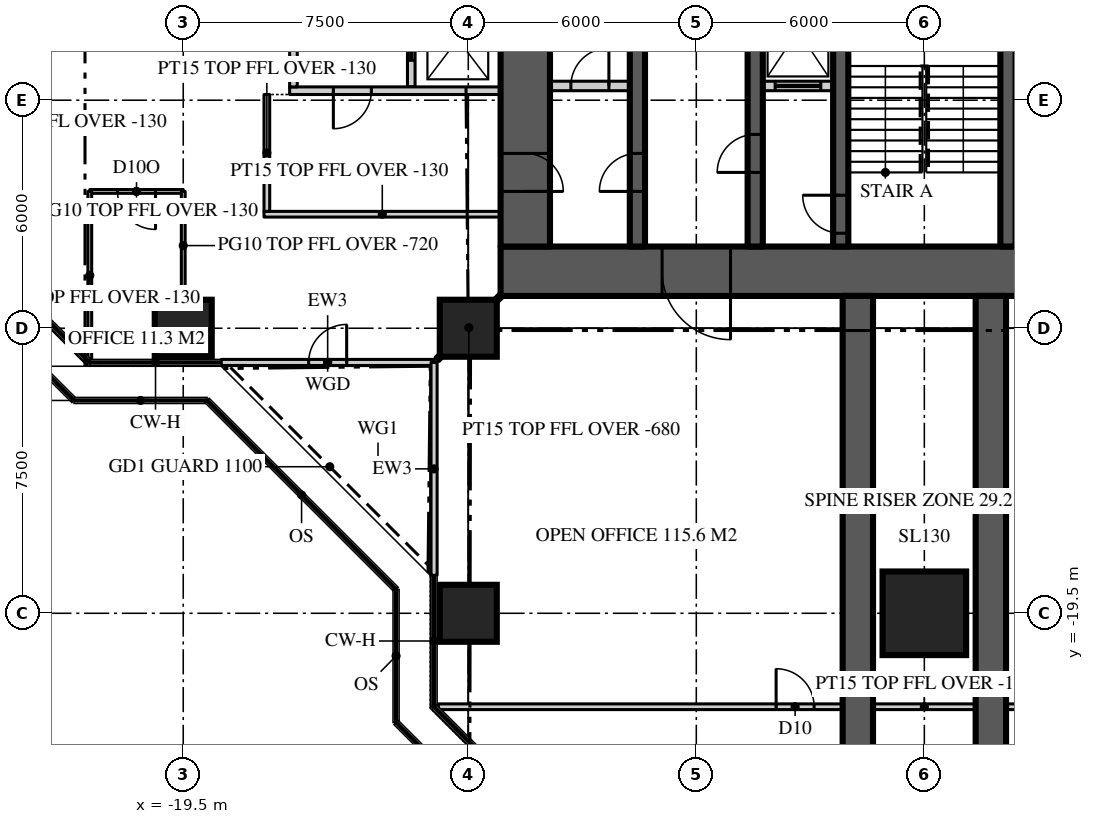
"""IFC4 building model, lengths in metres.
Left out: names, types, materials, properties, quantities, classifications, styles, units other than length and angle.
Written with IfcOpenShell. Run it as: python <this file> out.ifc"""

import sys

from ifc_helpers import new_model, si_unit, direction, frame, frame_2d, origin, origin_2d, place, context, subcontext, project, spatial, rectangle, extrude, element, fill, save


model = new_model("IFC4")
c1 = context("Model", 3, precision=1e-05, world=origin(), true_north=direction((0.0, 1.0)))
c2 = subcontext(c1, "Body", "Model", "MODEL_VIEW")
j1 = project(units=[si_unit("LENGTHUNIT", "METRE"), si_unit("PLANEANGLEUNIT", "RADIAN")], contexts=[c1])
p1 = place(None, origin())
s1 = spatial("IfcSite", under=j1, at=p1, CompositionType="ELEMENT")
p2 = place(p1, origin())
s2 = spatial("IfcBuilding", under=s1, at=p2, CompositionType="ELEMENT")
p3 = place(p2, frame((0.0, 0.0, 204.9)))
s3 = spatial("IfcBuildingStorey", under=s2, at=p3, CompositionType="ELEMENT", Elevation=204.9)
p4 = place(p3, frame((11.15, -10.5, 0.0), z_axis=(0.0, 0.0, 1.0), x_axis=(-1.0, 0.0, 0.0)))
e1 = element("IfcWall", 1, at=p4, inside=s3, PredefinedType="SHEAR", context=c2, shape_type="SweptSolid", body=[
    extrude(rectangle(XDim=22.3, YDim=1.3, at=frame_2d((11.15, 0.0))), origin(), (0.0, 0.0, 1.0), 3.9),
])
p5 = place(p4, frame((16.25, 0.0, 0.0)))
e2 = element("IfcOpeningElement", 2, at=p5, cuts=e1, PredefinedType="OPENING", context=c2, shape_type="SweptSolid", body=[
    extrude(rectangle(XDim=1.8, YDim=2.2, at=frame_2d((0.9, 1.1))), frame((0.0, 0.66, 0.0), z_axis=(0.0, -1.0, 0.0), x_axis=(1.0, 0.0, 0.0)), (0.0, 0.0, 1.0), 1.32),
])
p6 = place(p4, frame((4.25, 0.0, 0.0)))
e3 = element("IfcOpeningElement", 3, at=p6, cuts=e1, PredefinedType="OPENING", context=c2, shape_type="SweptSolid", body=[
    extrude(rectangle(XDim=1.8, YDim=2.2, at=frame_2d((0.9, 1.1))), frame((0.0, 0.66, 0.0), z_axis=(0.0, -1.0, 0.0), x_axis=(1.0, 0.0, 0.0)), (0.0, 0.0, 1.0), 1.32),
])
p7 = place(p3, frame((-10.5, 9.85, 0.0), z_axis=(0.0, 0.0, 1.0), x_axis=(0.0, -1.0, 0.0)))
e4 = element("IfcWall", 4, at=p7, inside=s3, PredefinedType="SHEAR", context=c2, shape_type="SweptSolid", body=[
    extrude(rectangle(XDim=19.7, YDim=1.3, at=frame_2d((9.85, 0.0))), origin(), (0.0, 0.0, 1.0), 3.9),
])
p8 = place(p7, frame((17.25, 0.0, 0.0)))
e5 = element("IfcOpeningElement", 5, at=p8, cuts=e4, PredefinedType="OPENING", context=c2, shape_type="SweptSolid", body=[
    extrude(rectangle(XDim=1.0, YDim=2.2, at=frame_2d((0.5, 1.1))), frame((0.0, 0.66, 0.0), z_axis=(0.0, -1.0, 0.0), x_axis=(1.0, 0.0, 0.0)), (0.0, 0.0, 1.0), 1.32),
])
for number, where, z_axis, x_axis in (
    (6, (-1.75, -11.15, 0.0), (0.0, 0.0, 1.0), (0.0, -1.0, 0.0)),
    (7, (1.75, -11.15, 0.0), (0.0, 0.0, 1.0), (0.0, -1.0, 0.0)),
):
    element("IfcWall", number, at=place(p3, frame(where, z_axis=z_axis, x_axis=x_axis)), inside=s3, PredefinedType="SHEAR", context=c2, shape_type="SweptSolid", body=[
        extrude(rectangle(XDim=15.25, YDim=0.8, at=frame_2d((7.625, 0.0))), origin(), (0.0, 0.0, 1.0), 3.9),
    ])
p9 = place(p3, frame((-12.0, -19.5, 0.0), z_axis=(0.0, 0.0, 1.0), x_axis=(1.0, 0.0, 0.0)))
e8 = element("IfcColumn", 8, at=p9, inside=s3, PredefinedType="COLUMN", context=c2, shape_type="SweptSolid", body=[
    extrude(rectangle(XDim=1.5, YDim=1.5, at=origin_2d()), origin(), (0.0, 0.0, 1.0), 3.9),
])
p10 = place(p3, frame((0.0, -19.5, 0.0), z_axis=(0.0, 0.0, 1.0), x_axis=(1.0, 0.0, 0.0)))
e9 = element("IfcColumn", 9, at=p10, inside=s3, PredefinedType="COLUMN", context=c2, shape_type="SweptSolid", body=[
    extrude(rectangle(XDim=2.2, YDim=2.2, at=origin_2d()), origin(), (0.0, 0.0, 1.0), 3.9),
])
for number, where, z_axis, x_axis in (
    (10, (-19.5, -12.0, 0.0), (0.0, 0.0, 1.0), (1.0, 0.0, 0.0)),
    (11, (-12.0, -12.0, 0.0), (0.0, 0.0, 1.0), (1.0, 0.0, 0.0)),
):
    element("IfcColumn", number, at=place(p3, frame(where, z_axis=z_axis, x_axis=x_axis)), inside=s3, PredefinedType="COLUMN", context=c2, shape_type="SweptSolid", body=[
        extrude(rectangle(XDim=1.5, YDim=1.5, at=origin_2d()), origin(), (0.0, 0.0, 1.0), 3.9),
    ])
p11 = place(p3, frame((-18.5, -12.9, 0.0), z_axis=(0.0, 0.0, 1.0), x_axis=(1.0, 0.0, 0.0)))
e12 = element("IfcWall", 12, at=p11, inside=s3, PredefinedType="SOLIDWALL", context=c2, shape_type="SweptSolid", body=[
    extrude(rectangle(XDim=5.6, YDim=0.16, at=frame_2d((2.8, 0.0))), origin(), (0.0, 0.0, 1.0), 3.77),
])
p12 = place(p11, frame((2.3, 0.0, 0.0)))
e13 = element("IfcOpeningElement", 13, at=p12, cuts=e12, PredefinedType="OPENING", context=c2, shape_type="SweptSolid", body=[
    extrude(rectangle(XDim=1.0, YDim=2.2, at=frame_2d((0.5, 1.1))), frame((0.0, 0.09, 0.0), z_axis=(0.0, -1.0, 0.0), x_axis=(1.0, 0.0, 0.0)), (0.0, 0.0, 1.0), 0.18),
])
p13 = place(p3, frame((-12.9, -12.9, 0.0), z_axis=(0.0, 0.0, 1.0), x_axis=(0.0, -1.0, 0.0)))
e14 = element("IfcWall", 14, at=p13, inside=s3, PredefinedType="SOLIDWALL", context=c2, shape_type="SweptSolid", body=[
    extrude(rectangle(XDim=5.6, YDim=0.16, at=frame_2d((2.8, 0.0))), origin(), (0.0, 0.0, 1.0), 3.77),
])
p14 = place(p3, frame((-7.55, -9.85, 0.0), z_axis=(0.0, 0.0, 1.0), x_axis=(0.0, 1.0, 0.0)))
e15 = element("IfcWall", 15, at=p14, inside=s3, PredefinedType="SHEAR", context=c2, shape_type="SweptSolid", body=[
    extrude(rectangle(XDim=19.7, YDim=0.4, at=frame_2d((9.85, 0.0))), origin(), (0.0, 0.0, 1.0), 3.9),
])
p15 = place(p14, frame((1.45, 0.0, 0.0)))
e16 = element("IfcOpeningElement", 16, at=p15, cuts=e15, PredefinedType="OPENING", context=c2, shape_type="SweptSolid", body=[
    extrude(rectangle(XDim=1.0, YDim=2.2, at=frame_2d((0.5, 1.1))), frame((0.0, 0.21, 0.0), z_axis=(0.0, -1.0, 0.0), x_axis=(1.0, 0.0, 0.0)), (0.0, 0.0, 1.0), 0.42),
])
p16 = place(p14, frame((17.3, 0.0, 0.0)))
e17 = element("IfcOpeningElement", 17, at=p16, cuts=e15, PredefinedType="OPENING", context=c2, shape_type="SweptSolid", body=[
    extrude(rectangle(XDim=0.9, YDim=2.1, at=frame_2d((0.45, 1.05))), frame((0.0, 0.21, 0.0), z_axis=(0.0, -1.0, 0.0), x_axis=(1.0, 0.0, 0.0)), (0.0, 0.0, 1.0), 0.42),
])
p17 = place(p3, frame((-4.45, -9.85, 0.0), z_axis=(0.0, 0.0, 1.0), x_axis=(0.0, 1.0, 0.0)))
e18 = element("IfcWall", 18, at=p17, inside=s3, PredefinedType="SHEAR", context=c2, shape_type="SweptSolid", body=[
    extrude(rectangle(XDim=19.7, YDim=0.4, at=frame_2d((9.85, 0.0))), origin(), (0.0, 0.0, 1.0), 3.9),
])
p18 = place(p17, frame((1.95, 0.0, 0.0)))
e19 = element("IfcOpeningElement", 19, at=p18, cuts=e18, PredefinedType="OPENING", context=c2, shape_type="SweptSolid", body=[
    extrude(rectangle(XDim=1.0, YDim=2.2, at=frame_2d((0.5, 1.1))), frame((0.0, 0.21, 0.0), z_axis=(0.0, -1.0, 0.0), x_axis=(1.0, 0.0, 0.0)), (0.0, 0.0, 1.0), 0.42),
])
p19 = place(p17, frame((17.25, 0.0, 0.0)))
e20 = element("IfcOpeningElement", 20, at=p19, cuts=e18, PredefinedType="OPENING", context=c2, shape_type="SweptSolid", body=[
    extrude(rectangle(XDim=1.0, YDim=2.1, at=frame_2d((0.5, 1.05))), frame((0.0, 0.21, 0.0), z_axis=(0.0, -1.0, 0.0), x_axis=(1.0, 0.0, 0.0)), (0.0, 0.0, 1.0), 0.42),
])
p20 = place(p3, frame((-2.2, -9.85, 0.0), z_axis=(0.0, 0.0, 1.0), x_axis=(0.0, 1.0, 0.0)))
e21 = element("IfcWall", 21, at=p20, inside=s3, PredefinedType="SHEAR", context=c2, shape_type="SweptSolid", body=[
    extrude(rectangle(XDim=19.7, YDim=0.4, at=frame_2d((9.85, 0.0))), origin(), (0.0, 0.0, 1.0), 3.9),
])
p21 = place(p20, frame((0.35, 0.0, 0.0)))
e22 = element("IfcOpeningElement", 22, at=p21, cuts=e21, PredefinedType="OPENING", context=c2, shape_type="SweptSolid", body=[
    extrude(rectangle(XDim=1.0, YDim=2.2, at=frame_2d((0.5, 1.1))), frame((0.0, 0.21, 0.0), z_axis=(0.0, -1.0, 0.0), x_axis=(1.0, 0.0, 0.0)), (0.0, 0.0, 1.0), 0.42),
])
p22 = place(p3, frame((2.2, 9.85, 0.0), z_axis=(0.0, 0.0, 1.0), x_axis=(0.0, -1.0, 0.0)))
e23 = element("IfcWall", 23, at=p22, inside=s3, PredefinedType="SHEAR", context=c2, shape_type="SweptSolid", body=[
    extrude(rectangle(XDim=19.7, YDim=0.4, at=frame_2d((9.85, 0.0))), origin(), (0.0, 0.0, 1.0), 3.9),
])
p23 = place(p22, frame((0.35, 0.0, 0.0)))
e24 = element("IfcOpeningElement", 24, at=p23, cuts=e23, PredefinedType="OPENING", context=c2, shape_type="SweptSolid", body=[
    extrude(rectangle(XDim=1.0, YDim=2.2, at=frame_2d((0.5, 1.1))), frame((0.0, 0.21, 0.0), z_axis=(0.0, -1.0, 0.0), x_axis=(1.0, 0.0, 0.0)), (0.0, 0.0, 1.0), 0.42),
])
p24 = place(p3, frame((-9.85, -5.625, 0.0), z_axis=(0.0, 0.0, 1.0), x_axis=(1.0, 0.0, 0.0)))
e25 = element("IfcWall", 25, at=p24, inside=s3, PredefinedType="SOLIDWALL", context=c2, shape_type="SweptSolid", body=[
    extrude(rectangle(XDim=2.1, YDim=0.25, at=frame_2d((1.05, 0.0))), origin(), (0.0, 0.0, 1.0), 3.7),
])
p25 = place(p24, frame((0.55, 0.0, 0.0)))
e26 = element("IfcOpeningElement", 26, at=p25, cuts=e25, PredefinedType="OPENING", context=c2, shape_type="SweptSolid", body=[
    extrude(rectangle(XDim=1.0, YDim=2.2, at=frame_2d((0.5, 1.1))), frame((0.0, 0.135, 0.0), z_axis=(0.0, -1.0, 0.0), x_axis=(1.0, 0.0, 0.0)), (0.0, 0.0, 1.0), 0.27),
])
p26 = place(p3, frame((-4.25, -5.625, 0.0), z_axis=(0.0, 0.0, 1.0), x_axis=(1.0, 0.0, 0.0)))
e27 = element("IfcWall", 27, at=p26, inside=s3, PredefinedType="SOLIDWALL", context=c2, shape_type="SweptSolid", body=[
    extrude(rectangle(XDim=1.85, YDim=0.25, at=frame_2d((0.925, 0.0))), origin(), (0.0, 0.0, 1.0), 3.7),
])
p27 = place(p26, frame((0.325, 0.0, 0.0)))
e28 = element("IfcOpeningElement", 28, at=p27, cuts=e27, PredefinedType="OPENING", context=c2, shape_type="SweptSolid", body=[
    extrude(rectangle(XDim=1.2, YDim=2.2, at=frame_2d((0.6, 1.1))), frame((0.0, 0.135, 0.0), z_axis=(0.0, -1.0, 0.0), x_axis=(1.0, 0.0, 0.0)), (0.0, 0.0, 1.0), 0.27),
])
p28 = place(p3, frame((-19.5, -8.4, 0.0), z_axis=(0.0, 0.0, 1.0), x_axis=(-1.0, 0.0, 0.0)))
e29 = element("IfcWall", 29, at=p28, inside=s3, PredefinedType="PARTITIONING", context=c2, shape_type="SweptSolid", body=[
    extrude(rectangle(XDim=2.459, YDim=0.1, at=frame_2d((1.229, 0.0))), origin(), (0.0, 0.0, 1.0), 3.77),
])
p29 = place(p28, frame((0.729, 0.0, 0.0)))
e30 = element("IfcOpeningElement", 30, at=p29, cuts=e29, PredefinedType="OPENING", context=c2, shape_type="SweptSolid", body=[
    extrude(rectangle(XDim=1.0, YDim=2.2, at=frame_2d((0.5, 1.1))), frame((0.0, 0.06, 0.0), z_axis=(0.0, -1.0, 0.0), x_axis=(1.0, 0.0, 0.0)), (0.0, 0.0, 1.0), 0.12),
])
p30 = place(p3, frame((-19.5, -8.4, 0.0), z_axis=(0.0, 0.0, 1.0), x_axis=(0.0, -1.0, 0.0)))
e31 = element("IfcWall", 31, at=p30, inside=s3, PredefinedType="PARTITIONING", context=c2, shape_type="SweptSolid", body=[
    extrude(rectangle(XDim=2.85, YDim=0.1, at=frame_2d((1.425, 0.0))), origin(), (0.0, 0.0, 1.0), 3.18),
])
p31 = place(p3, frame((-21.959, -8.4, 0.0), z_axis=(0.0, 0.0, 1.0), x_axis=(0.0, -1.0, 0.0)))
e32 = element("IfcWall", 32, at=p31, inside=s3, PredefinedType="PARTITIONING", context=c2, shape_type="SweptSolid", body=[
    extrude(rectangle(XDim=4.42, YDim=0.1, at=frame_2d((2.21, 0.0))), origin(), (0.0, 0.0, 1.0), 3.77),
])
p32 = place(p3, frame((-12.786, -21.959, 0.0), z_axis=(0.0, 0.0, 1.0), x_axis=(1.0, 0.0, 0.0)))
e33 = element("IfcWall", 33, at=p32, inside=s3, PredefinedType="PARTITIONING", context=c2, shape_type="SweptSolid", body=[
    extrude(rectangle(XDim=25.573, YDim=0.15, at=frame_2d((12.786, 0.0))), origin(), (0.0, 0.0, 1.0), 3.77),
])
p33 = place(p32, frame((15.687, 0.0, 0.0)))
e34 = element("IfcOpeningElement", 34, at=p33, cuts=e33, PredefinedType="OPENING", context=c2, shape_type="SweptSolid", body=[
    extrude(rectangle(XDim=1.0, YDim=2.2, at=frame_2d((0.5, 1.1))), frame((0.0, 0.085, 0.0), z_axis=(0.0, -1.0, 0.0), x_axis=(1.0, 0.0, 0.0)), (0.0, 0.0, 1.0), 0.17),
])
p34 = place(p32, frame((8.886, 0.0, 0.0)))
e35 = element("IfcOpeningElement", 35, at=p34, cuts=e33, PredefinedType="OPENING", context=c2, shape_type="SweptSolid", body=[
    extrude(rectangle(XDim=1.0, YDim=2.2, at=frame_2d((0.5, 1.1))), frame((0.0, 0.085, 0.0), z_axis=(0.0, -1.0, 0.0), x_axis=(1.0, 0.0, 0.0)), (0.0, 0.0, 1.0), 0.17),
])
p35 = place(p3, frame((-13.5, 5.65, 0.0), z_axis=(0.0, 0.0, 1.0), x_axis=(0.0, -1.0, 0.0)))
e36 = element("IfcWall", 36, at=p35, inside=s3, PredefinedType="SOLIDWALL", context=c2, shape_type="SweptSolid", body=[
    extrude(rectangle(XDim=11.3, YDim=0.2, at=frame_2d((5.65, 0.0))), origin(), (0.0, 0.0, 1.0), 3.7),
])
p36 = place(p35, frame((0.7, 0.0, 0.0)))
e37 = element("IfcOpeningElement", 37, at=p36, cuts=e36, PredefinedType="OPENING", context=c2, shape_type="SweptSolid", body=[
    extrude(rectangle(XDim=1.1, YDim=2.2, at=frame_2d((0.55, 1.1))), frame((0.0, 0.11, 0.0), z_axis=(0.0, -1.0, 0.0), x_axis=(1.0, 0.0, 0.0)), (0.0, 0.0, 1.0), 0.22),
])
p37 = place(p35, frame((3.4, 0.0, 0.0)))
e38 = element("IfcOpeningElement", 38, at=p37, cuts=e36, PredefinedType="OPENING", context=c2, shape_type="SweptSolid", body=[
    extrude(rectangle(XDim=1.1, YDim=2.2, at=frame_2d((0.55, 1.1))), frame((0.0, 0.11, 0.0), z_axis=(0.0, -1.0, 0.0), x_axis=(1.0, 0.0, 0.0)), (0.0, 0.0, 1.0), 0.22),
])
p38 = place(p35, frame((6.8, 0.0, 0.0)))
e39 = element("IfcOpeningElement", 39, at=p38, cuts=e36, PredefinedType="OPENING", context=c2, shape_type="SweptSolid", body=[
    extrude(rectangle(XDim=1.1, YDim=2.2, at=frame_2d((0.55, 1.1))), frame((0.0, 0.11, 0.0), z_axis=(0.0, -1.0, 0.0), x_axis=(1.0, 0.0, 0.0)), (0.0, 0.0, 1.0), 0.22),
])
p39 = place(p35, frame((9.5, 0.0, 0.0)))
e40 = element("IfcOpeningElement", 40, at=p39, cuts=e36, PredefinedType="OPENING", context=c2, shape_type="SweptSolid", body=[
    extrude(rectangle(XDim=1.1, YDim=2.2, at=frame_2d((0.55, 1.1))), frame((0.0, 0.11, 0.0), z_axis=(0.0, -1.0, 0.0), x_axis=(1.0, 0.0, 0.0)), (0.0, 0.0, 1.0), 0.22),
])
p40 = place(p3, frame((-11.15, -5.75, 0.0), z_axis=(0.0, 0.0, 1.0), x_axis=(-1.0, 0.0, 0.0)))
e41 = element("IfcWall", 41, at=p40, inside=s3, PredefinedType="SOLIDWALL", context=c2, shape_type="SweptSolid", body=[
    extrude(rectangle(XDim=5.55, YDim=0.2, at=frame_2d((2.775, 0.0))), origin(), (0.0, 0.0, 1.0), 3.7),
])
p41 = place(p40, frame((3.4, 0.0, 0.0)))
e42 = element("IfcOpeningElement", 42, at=p41, cuts=e41, PredefinedType="OPENING", context=c2, shape_type="SweptSolid", body=[
    extrude(rectangle(XDim=1.0, YDim=2.2, at=frame_2d((0.5, 1.1))), frame((0.0, 0.11, 0.0), z_axis=(0.0, -1.0, 0.0), x_axis=(1.0, 0.0, 0.0)), (0.0, 0.0, 1.0), 0.22),
])
p42 = place(p3, frame((-16.6, 5.65, 0.0), z_axis=(0.0, 0.0, 1.0), x_axis=(0.0, -1.0, 0.0)))
e43 = element("IfcWall", 43, at=p42, inside=s3, PredefinedType="SOLIDWALL", context=c2, shape_type="SweptSolid", body=[
    extrude(rectangle(XDim=11.3, YDim=0.2, at=frame_2d((5.65, 0.0))), origin(), (0.0, 0.0, 1.0), 3.18),
])
p43 = place(p42, frame((4.75, 0.0, 0.0)))
e44 = element("IfcOpeningElement", 44, at=p43, cuts=e43, PredefinedType="OPENING", context=c2, shape_type="SweptSolid", body=[
    extrude(rectangle(XDim=1.8, YDim=2.2, at=frame_2d((0.9, 1.1))), frame((0.0, 0.11, 0.0), z_axis=(0.0, -1.0, 0.0), x_axis=(1.0, 0.0, 0.0)), (0.0, 0.0, 1.0), 0.22),
])
p44 = place(p3, frame((-11.15, -11.15, 0.0), z_axis=(0.0, 0.0, 1.0), x_axis=(-0.707106781187, -0.707106781187, 0.0)))
e45 = element("IfcWall", 45, at=p44, inside=s3, PredefinedType="PARTITIONING", context=c2, shape_type="SweptSolid", body=[
    extrude(rectangle(XDim=2.362, YDim=0.15, at=frame_2d((1.181, 0.0))), origin(), (0.0, 0.0, 1.0), 3.22),
])
p45 = place(p3, frame((-11.15, -9.0, 0.0), z_axis=(0.0, 0.0, 1.0), x_axis=(-1.0, 0.0, 0.0)))
e46 = element("IfcWall", 46, at=p45, inside=s3, PredefinedType="PARTITIONING", context=c2, shape_type="SweptSolid", body=[
    extrude(rectangle(XDim=6.225, YDim=0.15, at=frame_2d((3.113, 0.0))), origin(), (0.0, 0.0, 1.0), 3.77),
])
p46 = place(p3, frame((-17.3, -5.85, 0.0), z_axis=(0.0, 0.0, 1.0), x_axis=(0.0, -1.0, 0.0)))
e47 = element("IfcWall", 47, at=p46, inside=s3, PredefinedType="PARTITIONING", context=c2, shape_type="SweptSolid", body=[
    extrude(rectangle(XDim=3.075, YDim=0.15, at=frame_2d((1.538, 0.0))), origin(), (0.0, 0.0, 1.0), 3.77),
])
p47 = place(p12, origin())
e48 = element("IfcDoor", 48, at=p47, inside=s3, OperationType="SINGLE_SWING_RIGHT", PredefinedType="DOOR", context=c2, shape_type="SweptSolid", body=[
    extrude(rectangle(XDim=1.0, YDim=2.2, at=frame_2d((0.5, 1.1))), frame((0.0, 0.025, 0.0), z_axis=(0.0, -1.0, 0.0), x_axis=(1.0, 0.0, 0.0)), (0.0, 0.0, 1.0), 0.05),
])
fill(e13, e48)
p48 = place(p5, origin())
e49 = element("IfcDoor", 49, at=p48, inside=s3, OperationType="DOUBLE_DOOR_DOUBLE_SWING", PredefinedType="DOOR", context=c2, shape_type="SweptSolid", body=[
    extrude(rectangle(XDim=1.8, YDim=2.2, at=frame_2d((0.9, 1.1))), frame((0.0, 0.025, 0.0), z_axis=(0.0, -1.0, 0.0), x_axis=(1.0, 0.0, 0.0)), (0.0, 0.0, 1.0), 0.05),
])
fill(e2, e49)
p49 = place(p15, origin())
e50 = element("IfcDoor", 50, at=p49, inside=s3, OperationType="SINGLE_SWING_LEFT", PredefinedType="DOOR", context=c2, shape_type="SweptSolid", body=[
    extrude(rectangle(XDim=1.0, YDim=2.2, at=frame_2d((0.5, 1.1))), frame((0.0, 0.025, 0.0), z_axis=(0.0, -1.0, 0.0), x_axis=(1.0, 0.0, 0.0)), (0.0, 0.0, 1.0), 0.05),
])
fill(e16, e50)
p50 = place(p8, origin())
e51 = element("IfcDoor", 51, at=p50, inside=s3, OperationType="SINGLE_SWING_RIGHT", PredefinedType="DOOR", context=c2, shape_type="SweptSolid", body=[
    extrude(rectangle(XDim=1.0, YDim=2.2, at=frame_2d((0.5, 1.1))), frame((0.0, 0.025, 0.0), z_axis=(0.0, -1.0, 0.0), x_axis=(1.0, 0.0, 0.0)), (0.0, 0.0, 1.0), 0.05),
])
fill(e5, e51)
p51 = place(p18, origin())
e52 = element("IfcDoor", 52, at=p51, inside=s3, OperationType="SINGLE_SWING_LEFT", PredefinedType="DOOR", context=c2, shape_type="SweptSolid", body=[
    extrude(rectangle(XDim=1.0, YDim=2.2, at=frame_2d((0.5, 1.1))), frame((0.0, 0.025, 0.0), z_axis=(0.0, -1.0, 0.0), x_axis=(1.0, 0.0, 0.0)), (0.0, 0.0, 1.0), 0.05),
])
fill(e19, e52)
p52 = place(p21, origin())
e53 = element("IfcDoor", 53, at=p52, inside=s3, OperationType="SINGLE_SWING_RIGHT", PredefinedType="DOOR", context=c2, shape_type="SweptSolid", body=[
    extrude(rectangle(XDim=1.0, YDim=2.2, at=frame_2d((0.5, 1.1))), frame((0.0, 0.025, 0.0), z_axis=(0.0, -1.0, 0.0), x_axis=(1.0, 0.0, 0.0)), (0.0, 0.0, 1.0), 0.05),
])
fill(e22, e53)
p53 = place(p27, origin())
e54 = element("IfcDoor", 54, at=p53, inside=s3, OperationType="SLIDING_TO_LEFT", PredefinedType="DOOR", context=c2, shape_type="SweptSolid", body=[
    extrude(rectangle(XDim=1.2, YDim=2.2, at=frame_2d((0.6, 1.1))), frame((0.0, 0.025, 0.0), z_axis=(0.0, -1.0, 0.0), x_axis=(1.0, 0.0, 0.0)), (0.0, 0.0, 1.0), 0.05),
])
fill(e28, e54)
p54 = place(p29, origin())
e55 = element("IfcDoor", 55, at=p54, inside=s3, OperationType="SINGLE_SWING_LEFT", PredefinedType="DOOR", context=c2, shape_type="SweptSolid", body=[
    extrude(rectangle(XDim=1.0, YDim=2.2, at=frame_2d((0.5, 1.1))), frame((0.0, 0.025, 0.0), z_axis=(0.0, -1.0, 0.0), x_axis=(1.0, 0.0, 0.0)), (0.0, 0.0, 1.0), 0.05),
])
fill(e30, e55)
p55 = place(p34, origin())
e56 = element("IfcDoor", 56, at=p55, inside=s3, OperationType="SINGLE_SWING_LEFT", PredefinedType="DOOR", context=c2, shape_type="SweptSolid", body=[
    extrude(rectangle(XDim=1.0, YDim=2.2, at=frame_2d((0.5, 1.1))), frame((0.0, 0.025, 0.0), z_axis=(0.0, -1.0, 0.0), x_axis=(1.0, 0.0, 0.0)), (0.0, 0.0, 1.0), 0.05),
])
fill(e35, e56)
p56 = place(p39, origin())
e57 = element("IfcDoor", 57, at=p56, inside=s3, OperationType="SLIDING_TO_LEFT", PredefinedType="DOOR", context=c2, shape_type="SweptSolid", body=[
    extrude(rectangle(XDim=1.1, YDim=2.2, at=frame_2d((0.55, 1.1))), frame((0.0, 0.025, 0.0), z_axis=(0.0, -1.0, 0.0), x_axis=(1.0, 0.0, 0.0)), (0.0, 0.0, 1.0), 0.05),
])
fill(e40, e57)
p57 = place(p41, origin())
e58 = element("IfcDoor", 58, at=p57, inside=s3, OperationType="SINGLE_SWING_RIGHT", PredefinedType="DOOR", context=c2, shape_type="SweptSolid", body=[
    extrude(rectangle(XDim=1.0, YDim=2.2, at=frame_2d((0.5, 1.1))), frame((0.0, 0.025, 0.0), z_axis=(0.0, -1.0, 0.0), x_axis=(1.0, 0.0, 0.0)), (0.0, 0.0, 1.0), 0.05),
])
fill(e42, e58)
p58 = place(p25, origin())
e59 = element("IfcDoor", 59, at=p58, inside=s3, OperationType="SINGLE_SWING_RIGHT", PredefinedType="DOOR", context=c2, shape_type="SweptSolid", body=[
    extrude(rectangle(XDim=1.0, YDim=2.2, at=frame_2d((0.5, 1.1))), frame((0.0, 0.025, 0.0), z_axis=(0.0, -1.0, 0.0), x_axis=(1.0, 0.0, 0.0)), (0.0, 0.0, 1.0), 0.05),
])
fill(e26, e59)
save(model, sys.argv[1])
